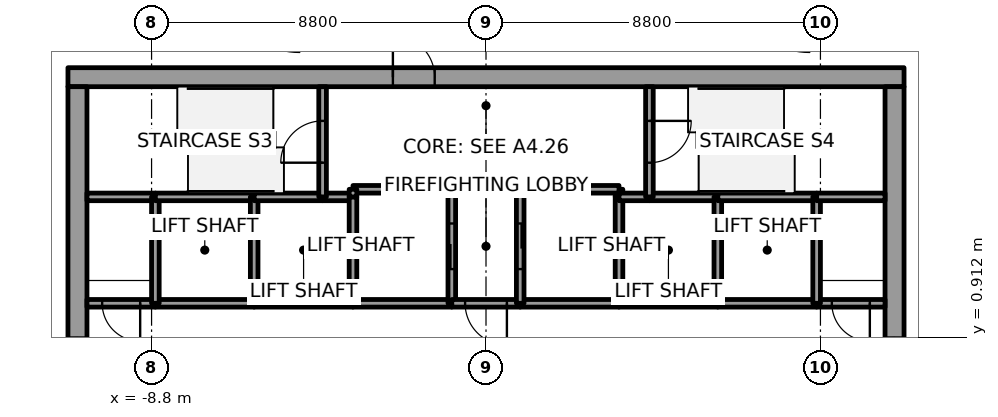
"""IFC4 building model, lengths in metres.
Left out: names, types, materials, properties, quantities, classifications, styles, units other than length and angle.
Written with IfcOpenShell. Run it as: python <this file> out.ifc"""

import sys

from ifc_helpers import new_model, si_unit, direction, frame, frame_2d, origin, place, context, subcontext, project, spatial, rectangle, extrude, element, fill, save


model = new_model("IFC4")
c1 = context("Model", 3, precision=1e-05, world=origin(), true_north=direction((0.0, 1.0)))
c2 = subcontext(c1, "Body", "Model", "MODEL_VIEW")
j1 = project(units=[si_unit("LENGTHUNIT", "METRE"), si_unit("PLANEANGLEUNIT", "RADIAN")], contexts=[c1])
p1 = place(None, origin())
s1 = spatial("IfcSite", under=j1, at=p1, CompositionType="ELEMENT")
p2 = place(p1, origin())
s2 = spatial("IfcBuilding", under=s1, at=p2, CompositionType="ELEMENT")
p3 = place(p2, frame((0.0, 0.0, 112.6)))
s3 = spatial("IfcBuildingStorey", under=s2, at=p3, CompositionType="ELEMENT", Elevation=112.6)
p4 = place(p3, frame((-11.0, 7.75, 0.0), z_axis=(0.0, 0.0, 1.0), x_axis=(1.0, 0.0, 0.0)))
e1 = element("IfcWall", 1, at=p4, inside=s3, PredefinedType="SHEAR", context=c2, shape_type="SweptSolid", body=[
    extrude(rectangle(XDim=22.0, YDim=0.5, at=frame_2d((11.0, 0.0))), origin(), (0.0, 0.0, 1.0), 6.0),
])
p5 = place(p4, frame((8.55, 0.0, 0.0)))
e2 = element("IfcOpeningElement", 2, at=p5, cuts=e1, PredefinedType="OPENING", context=c2, shape_type="SweptSolid", body=[
    extrude(rectangle(XDim=1.1, YDim=2.1, at=frame_2d((0.55, 1.05))), frame((0.0, 0.25, 0.0), z_axis=(0.0, -1.0, 0.0), x_axis=(1.0, 0.0, 0.0)), (0.0, 0.0, 1.0), 0.5),
])
p6 = place(p3, frame((-10.75, -7.5, 0.0), z_axis=(0.0, 0.0, 1.0), x_axis=(0.0, 1.0, 0.0)))
e3 = element("IfcWall", 3, at=p6, inside=s3, PredefinedType="SHEAR", context=c2, shape_type="SweptSolid", body=[
    extrude(rectangle(XDim=15.0, YDim=0.5, at=frame_2d((7.5, 0.0))), origin(), (0.0, 0.0, 1.0), 6.0),
])
p7 = place(p6, frame((6.6, 0.0, 0.0)))
e4 = element("IfcOpeningElement", 4, at=p7, cuts=e3, PredefinedType="OPENING", context=c2, shape_type="SweptSolid", body=[
    extrude(rectangle(XDim=1.8, YDim=2.1, at=frame_2d((0.9, 1.05))), frame((0.0, 0.25, 0.0), z_axis=(0.0, -1.0, 0.0), x_axis=(1.0, 0.0, 0.0)), (0.0, 0.0, 1.0), 0.5),
])
p8 = place(p3, frame((10.75, -7.5, 0.0), z_axis=(0.0, 0.0, 1.0), x_axis=(0.0, 1.0, 0.0)))
e5 = element("IfcWall", 5, at=p8, inside=s3, PredefinedType="SHEAR", context=c2, shape_type="SweptSolid", body=[
    extrude(rectangle(XDim=15.0, YDim=0.5, at=frame_2d((7.5, 0.0))), origin(), (0.0, 0.0, 1.0), 6.0),
])
p9 = place(p8, frame((6.6, 0.0, 0.0)))
e6 = element("IfcOpeningElement", 6, at=p9, cuts=e5, PredefinedType="OPENING", context=c2, shape_type="SweptSolid", body=[
    extrude(rectangle(XDim=1.8, YDim=2.1, at=frame_2d((0.9, 1.05))), frame((0.0, 0.25, 0.0), z_axis=(0.0, -1.0, 0.0), x_axis=(1.0, 0.0, 0.0)), (0.0, 0.0, 1.0), 0.5),
])
p10 = place(p3, frame((-8.7, 1.8, 0.0), z_axis=(0.0, 0.0, 1.0), x_axis=(-1.0, 0.0, 0.0)))
e7 = element("IfcWall", 7, at=p10, inside=s3, PredefinedType="SOLIDWALL", context=c2, shape_type="SweptSolid", body=[
    extrude(rectangle(XDim=1.8, YDim=0.2, at=frame_2d((0.9, 0.0))), origin(), (0.0, 0.0, 1.0), 5.85),
])
p11 = place(p10, frame((0.4, 0.0, 0.0)))
e8 = element("IfcOpeningElement", 8, at=p11, cuts=e7, PredefinedType="OPENING", context=c2, shape_type="SweptSolid", body=[
    extrude(rectangle(XDim=1.0, YDim=2.1, at=frame_2d((0.5, 1.05))), frame((0.0, 0.1, 0.0), z_axis=(0.0, -1.0, 0.0), x_axis=(1.0, 0.0, 0.0)), (0.0, 0.0, 1.0), 0.2),
])
p12 = place(p3, frame((-8.7, 4.6, 0.0), z_axis=(0.0, 0.0, 1.0), x_axis=(-1.0, 0.0, 0.0)))
e9 = element("IfcWall", 9, at=p12, inside=s3, PredefinedType="SOLIDWALL", context=c2, shape_type="SweptSolid", body=[
    extrude(rectangle(XDim=1.8, YDim=0.2, at=frame_2d((0.9, 0.0))), origin(), (0.0, 0.0, 1.0), 5.85),
])
p13 = place(p3, frame((-6.1, 1.8, 0.0), z_axis=(0.0, 0.0, 1.0), x_axis=(-1.0, 0.0, 0.0)))
e10 = element("IfcWall", 10, at=p13, inside=s3, PredefinedType="SOLIDWALL", context=c2, shape_type="SweptSolid", body=[
    extrude(rectangle(XDim=2.6, YDim=0.2, at=frame_2d((1.3, 0.0))), origin(), (0.0, 0.0, 1.0), 5.85),
])
p14 = place(p3, frame((-8.7, 1.8, 0.0), z_axis=(0.0, 0.0, 1.0), x_axis=(0.0, 1.0, 0.0)))
e11 = element("IfcWall", 11, at=p14, inside=s3, PredefinedType="SOLIDWALL", context=c2, shape_type="SweptSolid", body=[
    extrude(rectangle(XDim=2.8, YDim=0.2, at=frame_2d((1.4, 0.0))), origin(), (0.0, 0.0, 1.0), 5.85),
])
p15 = place(p3, frame((-6.1, 4.6, 0.0), z_axis=(0.0, 0.0, 1.0), x_axis=(-1.0, 0.0, 0.0)))
e12 = element("IfcWall", 12, at=p15, inside=s3, PredefinedType="SOLIDWALL", context=c2, shape_type="SweptSolid", body=[
    extrude(rectangle(XDim=2.6, YDim=0.2, at=frame_2d((1.3, 0.0))), origin(), (0.0, 0.0, 1.0), 5.85),
])
p16 = place(p3, frame((-3.5, 1.8, 0.0), z_axis=(0.0, 0.0, 1.0), x_axis=(-1.0, 0.0, 0.0)))
e13 = element("IfcWall", 13, at=p16, inside=s3, PredefinedType="SOLIDWALL", context=c2, shape_type="SweptSolid", body=[
    extrude(rectangle(XDim=2.6, YDim=0.2, at=frame_2d((1.3, 0.0))), origin(), (0.0, 0.0, 1.0), 5.85),
])
p17 = place(p3, frame((-6.1, 1.8, 0.0), z_axis=(0.0, 0.0, 1.0), x_axis=(0.0, 1.0, 0.0)))
e14 = element("IfcWall", 14, at=p17, inside=s3, PredefinedType="SOLIDWALL", context=c2, shape_type="SweptSolid", body=[
    extrude(rectangle(XDim=2.8, YDim=0.2, at=frame_2d((1.4, 0.0))), origin(), (0.0, 0.0, 1.0), 5.85),
])
p18 = place(p3, frame((-4.3, 4.6, 0.0), z_axis=(0.0, 0.0, 1.0), x_axis=(-1.0, 0.0, 0.0)))
e15 = element("IfcWall", 15, at=p18, inside=s3, PredefinedType="SOLIDWALL", context=c2, shape_type="SweptSolid", body=[
    extrude(rectangle(XDim=1.8, YDim=0.2, at=frame_2d((0.9, 0.0))), origin(), (0.0, 0.0, 1.0), 5.85),
])
p19 = place(p3, frame((-3.5, 4.6, 0.0), z_axis=(0.0, 0.0, 1.0), x_axis=(-1.0, 0.0, 0.0)))
e16 = element("IfcWall", 16, at=p19, inside=s3, PredefinedType="SOLIDWALL", context=c2, shape_type="SweptSolid", body=[
    extrude(rectangle(XDim=0.8, YDim=0.2, at=frame_2d((0.4, 0.0))), origin(), (0.0, 0.0, 1.0), 5.85),
])
p20 = place(p3, frame((-4.3, 4.6, 0.0), z_axis=(0.0, 0.0, 1.0), x_axis=(0.0, 1.0, 0.0)))
e17 = element("IfcWall", 17, at=p20, inside=s3, PredefinedType="SOLIDWALL", context=c2, shape_type="SweptSolid", body=[
    extrude(rectangle(XDim=2.9, YDim=0.2, at=frame_2d((1.45, 0.0))), origin(), (0.0, 0.0, 1.0), 5.85),
])
p21 = place(p20, frame((0.9, 0.0, 0.0)))
e18 = element("IfcOpeningElement", 18, at=p21, cuts=e17, PredefinedType="OPENING", context=c2, shape_type="SweptSolid", body=[
    extrude(rectangle(XDim=1.1, YDim=2.1, at=frame_2d((0.55, 1.05))), frame((0.0, 0.1, 0.0), z_axis=(0.0, -1.0, 0.0), x_axis=(1.0, 0.0, 0.0)), (0.0, 0.0, 1.0), 0.2),
])
p22 = place(p3, frame((-0.9, 1.8, 0.0), z_axis=(0.0, 0.0, 1.0), x_axis=(-1.0, 0.0, 0.0)))
e19 = element("IfcWall", 19, at=p22, inside=s3, PredefinedType="SOLIDWALL", context=c2, shape_type="SweptSolid", body=[
    extrude(rectangle(XDim=2.6, YDim=0.2, at=frame_2d((1.3, 0.0))), origin(), (0.0, 0.0, 1.0), 5.85),
])
p23 = place(p3, frame((-3.5, 4.6, 0.0), z_axis=(0.0, 0.0, 1.0), x_axis=(0.0, -1.0, 0.0)))
e20 = element("IfcWall", 20, at=p23, inside=s3, PredefinedType="SOLIDWALL", context=c2, shape_type="SweptSolid", body=[
    extrude(rectangle(XDim=2.8, YDim=0.2, at=frame_2d((1.4, 0.0))), origin(), (0.0, 0.0, 1.0), 5.85),
])
p24 = place(p3, frame((-0.9, 1.8, 0.0), z_axis=(0.0, 0.0, 1.0), x_axis=(0.0, 1.0, 0.0)))
e21 = element("IfcWall", 21, at=p24, inside=s3, PredefinedType="SOLIDWALL", context=c2, shape_type="SweptSolid", body=[
    extrude(rectangle(XDim=3.0, YDim=0.2, at=frame_2d((1.5, 0.0))), origin(), (0.0, 0.0, 1.0), 5.85),
])
p25 = place(p24, frame((0.9, 0.0, 0.0)))
e22 = element("IfcOpeningElement", 22, at=p25, cuts=e21, PredefinedType="OPENING", context=c2, shape_type="SweptSolid", body=[
    extrude(rectangle(XDim=1.2, YDim=2.1, at=frame_2d((0.6, 1.05))), frame((0.0, 0.1, 0.0), z_axis=(0.0, -1.0, 0.0), x_axis=(1.0, 0.0, 0.0)), (0.0, 0.0, 1.0), 0.2),
])
p26 = place(p3, frame((-0.9, 4.8, 0.0), z_axis=(0.0, 0.0, 1.0), x_axis=(-1.0, 0.0, 0.0)))
e23 = element("IfcWall", 23, at=p26, inside=s3, PredefinedType="SOLIDWALL", context=c2, shape_type="SweptSolid", body=[
    extrude(rectangle(XDim=2.6, YDim=0.2, at=frame_2d((1.3, 0.0))), origin(), (0.0, 0.0, 1.0), 5.85),
])
p27 = place(p3, frame((-3.5, 4.8, 0.0), z_axis=(0.0, 0.0, 1.0), x_axis=(0.0, -1.0, 0.0)))
e24 = element("IfcWall", 24, at=p27, inside=s3, PredefinedType="SOLIDWALL", context=c2, shape_type="SweptSolid", body=[
    extrude(rectangle(XDim=0.2, YDim=0.2, at=frame_2d((0.1, 0.0))), origin(), (0.0, 0.0, 1.0), 5.85),
])
p28 = place(p3, frame((0.9, 1.8, 0.0), z_axis=(0.0, 0.0, 1.0), x_axis=(-1.0, 0.0, 0.0)))
e25 = element("IfcWall", 25, at=p28, inside=s3, PredefinedType="SOLIDWALL", context=c2, shape_type="SweptSolid", body=[
    extrude(rectangle(XDim=1.8, YDim=0.2, at=frame_2d((0.9, 0.0))), origin(), (0.0, 0.0, 1.0), 5.85),
])
p29 = place(p28, frame((0.35, 0.0, 0.0)))
e26 = element("IfcOpeningElement", 26, at=p29, cuts=e25, PredefinedType="OPENING", context=c2, shape_type="SweptSolid", body=[
    extrude(rectangle(XDim=1.1, YDim=2.1, at=frame_2d((0.55, 1.05))), frame((0.0, 0.1, 0.0), z_axis=(0.0, -1.0, 0.0), x_axis=(1.0, 0.0, 0.0)), (0.0, 0.0, 1.0), 0.2),
])
p30 = place(p3, frame((3.5, 1.8, 0.0), z_axis=(0.0, 0.0, 1.0), x_axis=(-1.0, 0.0, 0.0)))
e27 = element("IfcWall", 27, at=p30, inside=s3, PredefinedType="SOLIDWALL", context=c2, shape_type="SweptSolid", body=[
    extrude(rectangle(XDim=2.6, YDim=0.2, at=frame_2d((1.3, 0.0))), origin(), (0.0, 0.0, 1.0), 5.85),
])
p31 = place(p3, frame((3.5, 4.6, 0.0), z_axis=(0.0, 0.0, 1.0), x_axis=(0.0, 1.0, 0.0)))
e28 = element("IfcWall", 28, at=p31, inside=s3, PredefinedType="SOLIDWALL", context=c2, shape_type="SweptSolid", body=[
    extrude(rectangle(XDim=0.2, YDim=0.2, at=frame_2d((0.1, 0.0))), origin(), (0.0, 0.0, 1.0), 5.85),
])
p32 = place(p3, frame((3.5, 4.8, 0.0), z_axis=(0.0, 0.0, 1.0), x_axis=(-1.0, 0.0, 0.0)))
e29 = element("IfcWall", 29, at=p32, inside=s3, PredefinedType="SOLIDWALL", context=c2, shape_type="SweptSolid", body=[
    extrude(rectangle(XDim=2.6, YDim=0.2, at=frame_2d((1.3, 0.0))), origin(), (0.0, 0.0, 1.0), 5.85),
])
p33 = place(p3, frame((0.9, 4.8, 0.0), z_axis=(0.0, 0.0, 1.0), x_axis=(0.0, -1.0, 0.0)))
e30 = element("IfcWall", 30, at=p33, inside=s3, PredefinedType="SOLIDWALL", context=c2, shape_type="SweptSolid", body=[
    extrude(rectangle(XDim=3.0, YDim=0.2, at=frame_2d((1.5, 0.0))), origin(), (0.0, 0.0, 1.0), 5.85),
])
p34 = place(p33, frame((0.9, 0.0, 0.0)))
e31 = element("IfcOpeningElement", 31, at=p34, cuts=e30, PredefinedType="OPENING", context=c2, shape_type="SweptSolid", body=[
    extrude(rectangle(XDim=1.2, YDim=2.1, at=frame_2d((0.6, 1.05))), frame((0.0, 0.1, 0.0), z_axis=(0.0, -1.0, 0.0), x_axis=(1.0, 0.0, 0.0)), (0.0, 0.0, 1.0), 0.2),
])
p35 = place(p3, frame((6.1, 1.8, 0.0), z_axis=(0.0, 0.0, 1.0), x_axis=(-1.0, 0.0, 0.0)))
e32 = element("IfcWall", 32, at=p35, inside=s3, PredefinedType="SOLIDWALL", context=c2, shape_type="SweptSolid", body=[
    extrude(rectangle(XDim=2.6, YDim=0.2, at=frame_2d((1.3, 0.0))), origin(), (0.0, 0.0, 1.0), 5.85),
])
p36 = place(p3, frame((3.5, 1.8, 0.0), z_axis=(0.0, 0.0, 1.0), x_axis=(0.0, 1.0, 0.0)))
e33 = element("IfcWall", 33, at=p36, inside=s3, PredefinedType="SOLIDWALL", context=c2, shape_type="SweptSolid", body=[
    extrude(rectangle(XDim=2.8, YDim=0.2, at=frame_2d((1.4, 0.0))), origin(), (0.0, 0.0, 1.0), 5.85),
])
p37 = place(p3, frame((4.3, 4.6, 0.0), z_axis=(0.0, 0.0, 1.0), x_axis=(-1.0, 0.0, 0.0)))
e34 = element("IfcWall", 34, at=p37, inside=s3, PredefinedType="SOLIDWALL", context=c2, shape_type="SweptSolid", body=[
    extrude(rectangle(XDim=0.8, YDim=0.2, at=frame_2d((0.4, 0.0))), origin(), (0.0, 0.0, 1.0), 5.85),
])
p38 = place(p3, frame((6.1, 4.6, 0.0), z_axis=(0.0, 0.0, 1.0), x_axis=(-1.0, 0.0, 0.0)))
e35 = element("IfcWall", 35, at=p38, inside=s3, PredefinedType="SOLIDWALL", context=c2, shape_type="SweptSolid", body=[
    extrude(rectangle(XDim=1.8, YDim=0.2, at=frame_2d((0.9, 0.0))), origin(), (0.0, 0.0, 1.0), 5.85),
])
p39 = place(p3, frame((4.3, 7.5, 0.0), z_axis=(0.0, 0.0, 1.0), x_axis=(0.0, -1.0, 0.0)))
e36 = element("IfcWall", 36, at=p39, inside=s3, PredefinedType="SOLIDWALL", context=c2, shape_type="SweptSolid", body=[
    extrude(rectangle(XDim=2.9, YDim=0.2, at=frame_2d((1.45, 0.0))), origin(), (0.0, 0.0, 1.0), 5.85),
])
p40 = place(p39, frame((0.9, 0.0, 0.0)))
e37 = element("IfcOpeningElement", 37, at=p40, cuts=e36, PredefinedType="OPENING", context=c2, shape_type="SweptSolid", body=[
    extrude(rectangle(XDim=1.1, YDim=2.1, at=frame_2d((0.55, 1.05))), frame((0.0, 0.1, 0.0), z_axis=(0.0, -1.0, 0.0), x_axis=(1.0, 0.0, 0.0)), (0.0, 0.0, 1.0), 0.2),
])
p41 = place(p3, frame((8.7, 1.8, 0.0), z_axis=(0.0, 0.0, 1.0), x_axis=(-1.0, 0.0, 0.0)))
e38 = element("IfcWall", 38, at=p41, inside=s3, PredefinedType="SOLIDWALL", context=c2, shape_type="SweptSolid", body=[
    extrude(rectangle(XDim=2.6, YDim=0.2, at=frame_2d((1.3, 0.0))), origin(), (0.0, 0.0, 1.0), 5.85),
])
p42 = place(p3, frame((6.1, 1.8, 0.0), z_axis=(0.0, 0.0, 1.0), x_axis=(0.0, 1.0, 0.0)))
e39 = element("IfcWall", 39, at=p42, inside=s3, PredefinedType="SOLIDWALL", context=c2, shape_type="SweptSolid", body=[
    extrude(rectangle(XDim=2.8, YDim=0.2, at=frame_2d((1.4, 0.0))), origin(), (0.0, 0.0, 1.0), 5.85),
])
p43 = place(p3, frame((8.7, 4.6, 0.0), z_axis=(0.0, 0.0, 1.0), x_axis=(-1.0, 0.0, 0.0)))
e40 = element("IfcWall", 40, at=p43, inside=s3, PredefinedType="SOLIDWALL", context=c2, shape_type="SweptSolid", body=[
    extrude(rectangle(XDim=2.6, YDim=0.2, at=frame_2d((1.3, 0.0))), origin(), (0.0, 0.0, 1.0), 5.85),
])
p44 = place(p3, frame((10.5, 1.8, 0.0), z_axis=(0.0, 0.0, 1.0), x_axis=(-1.0, 0.0, 0.0)))
e41 = element("IfcWall", 41, at=p44, inside=s3, PredefinedType="SOLIDWALL", context=c2, shape_type="SweptSolid", body=[
    extrude(rectangle(XDim=1.8, YDim=0.2, at=frame_2d((0.9, 0.0))), origin(), (0.0, 0.0, 1.0), 5.85),
])
p45 = place(p44, frame((0.4, 0.0, 0.0)))
e42 = element("IfcOpeningElement", 42, at=p45, cuts=e41, PredefinedType="OPENING", context=c2, shape_type="SweptSolid", body=[
    extrude(rectangle(XDim=1.0, YDim=2.1, at=frame_2d((0.5, 1.05))), frame((0.0, 0.1, 0.0), z_axis=(0.0, -1.0, 0.0), x_axis=(1.0, 0.0, 0.0)), (0.0, 0.0, 1.0), 0.2),
])
p46 = place(p3, frame((8.7, 4.6, 0.0), z_axis=(0.0, 0.0, 1.0), x_axis=(0.0, -1.0, 0.0)))
e43 = element("IfcWall", 43, at=p46, inside=s3, PredefinedType="SOLIDWALL", context=c2, shape_type="SweptSolid", body=[
    extrude(rectangle(XDim=2.8, YDim=0.2, at=frame_2d((1.4, 0.0))), origin(), (0.0, 0.0, 1.0), 5.85),
])
p47 = place(p3, frame((10.5, 4.6, 0.0), z_axis=(0.0, 0.0, 1.0), x_axis=(-1.0, 0.0, 0.0)))
e44 = element("IfcWall", 44, at=p47, inside=s3, PredefinedType="SOLIDWALL", context=c2, shape_type="SweptSolid", body=[
    extrude(rectangle(XDim=1.8, YDim=0.2, at=frame_2d((0.9, 0.0))), origin(), (0.0, 0.0, 1.0), 5.85),
])
p48 = place(p25, origin())
e45 = element("IfcDoor", 45, at=p48, inside=s3, OperationType="SLIDING_TO_RIGHT", PredefinedType="DOOR", context=c2, shape_type="SweptSolid", body=[
    extrude(rectangle(XDim=1.2, YDim=2.1, at=frame_2d((0.6, 1.05))), frame((0.0, 0.025, 0.0), z_axis=(0.0, -1.0, 0.0), x_axis=(1.0, 0.0, 0.0)), (0.0, 0.0, 1.0), 0.05),
])
fill(e22, e45)
p49 = place(p34, origin())
e46 = element("IfcDoor", 46, at=p49, inside=s3, OperationType="SLIDING_TO_RIGHT", PredefinedType="DOOR", context=c2, shape_type="SweptSolid", body=[
    extrude(rectangle(XDim=1.2, YDim=2.1, at=frame_2d((0.6, 1.05))), frame((0.0, 0.025, 0.0), z_axis=(0.0, -1.0, 0.0), x_axis=(1.0, 0.0, 0.0)), (0.0, 0.0, 1.0), 0.05),
])
fill(e31, e46)
p50 = place(p29, origin())
e47 = element("IfcDoor", 47, at=p50, inside=s3, OperationType="SINGLE_SWING_RIGHT", PredefinedType="DOOR", context=c2, shape_type="SweptSolid", body=[
    extrude(rectangle(XDim=1.1, YDim=2.1, at=frame_2d((0.55, 1.05))), frame((0.0, 0.025, 0.0), z_axis=(0.0, -1.0, 0.0), x_axis=(1.0, 0.0, 0.0)), (0.0, 0.0, 1.0), 0.05),
])
fill(e26, e47)
p51 = place(p11, origin())
e48 = element("IfcDoor", 48, at=p51, inside=s3, OperationType="SINGLE_SWING_RIGHT", PredefinedType="DOOR", context=c2, shape_type="SweptSolid", body=[
    extrude(rectangle(XDim=1.0, YDim=2.1, at=frame_2d((0.5, 1.05))), frame((0.0, 0.025, 0.0), z_axis=(0.0, -1.0, 0.0), x_axis=(1.0, 0.0, 0.0)), (0.0, 0.0, 1.0), 0.05),
])
fill(e8, e48)
p52 = place(p45, origin())
e49 = element("IfcDoor", 49, at=p52, inside=s3, OperationType="SINGLE_SWING_RIGHT", PredefinedType="DOOR", context=c2, shape_type="SweptSolid", body=[
    extrude(rectangle(XDim=1.0, YDim=2.1, at=frame_2d((0.5, 1.05))), frame((0.0, 0.025, 0.0), z_axis=(0.0, -1.0, 0.0), x_axis=(1.0, 0.0, 0.0)), (0.0, 0.0, 1.0), 0.05),
])
fill(e42, e49)
p53 = place(p21, origin())
e50 = element("IfcDoor", 50, at=p53, inside=s3, OperationType="SINGLE_SWING_RIGHT", PredefinedType="DOOR", context=c2, shape_type="SweptSolid", body=[
    extrude(rectangle(XDim=1.1, YDim=2.1, at=frame_2d((0.55, 1.05))), frame((0.0, 0.025, 0.0), z_axis=(0.0, -1.0, 0.0), x_axis=(1.0, 0.0, 0.0)), (0.0, 0.0, 1.0), 0.05),
])
fill(e18, e50)
p54 = place(p40, origin())
e51 = element("IfcDoor", 51, at=p54, inside=s3, OperationType="SINGLE_SWING_LEFT", PredefinedType="DOOR", context=c2, shape_type="SweptSolid", body=[
    extrude(rectangle(XDim=1.1, YDim=2.1, at=frame_2d((0.55, 1.05))), frame((0.0, 0.025, 0.0), z_axis=(0.0, -1.0, 0.0), x_axis=(1.0, 0.0, 0.0)), (0.0, 0.0, 1.0), 0.05),
])
fill(e37, e51)
p55 = place(p7, origin())
e52 = element("IfcDoor", 52, at=p55, inside=s3, OperationType="DOUBLE_DOOR_SINGLE_SWING", PredefinedType="DOOR", context=c2, shape_type="SweptSolid", body=[
    extrude(rectangle(XDim=1.8, YDim=2.1, at=frame_2d((0.9, 1.05))), frame((0.0, 0.025, 0.0), z_axis=(0.0, -1.0, 0.0), x_axis=(1.0, 0.0, 0.0)), (0.0, 0.0, 1.0), 0.05),
])
fill(e4, e52)
p56 = place(p9, origin())
e53 = element("IfcDoor", 53, at=p56, inside=s3, OperationType="DOUBLE_DOOR_SINGLE_SWING", PredefinedType="DOOR", context=c2, shape_type="SweptSolid", body=[
    extrude(rectangle(XDim=1.8, YDim=2.1, at=frame_2d((0.9, 1.05))), frame((0.0, 0.025, 0.0), z_axis=(0.0, -1.0, 0.0), x_axis=(1.0, 0.0, 0.0)), (0.0, 0.0, 1.0), 0.05),
])
fill(e6, e53)
p57 = place(p5, origin())
e54 = element("IfcDoor", 54, at=p57, inside=s3, OperationType="SINGLE_SWING_LEFT", PredefinedType="DOOR", context=c2, shape_type="SweptSolid", body=[
    extrude(rectangle(XDim=1.1, YDim=2.1, at=frame_2d((0.55, 1.05))), frame((0.0, 0.025, 0.0), z_axis=(0.0, -1.0, 0.0), x_axis=(1.0, 0.0, 0.0)), (0.0, 0.0, 1.0), 0.05),
])
fill(e2, e54)
save(model, sys.argv[1])
